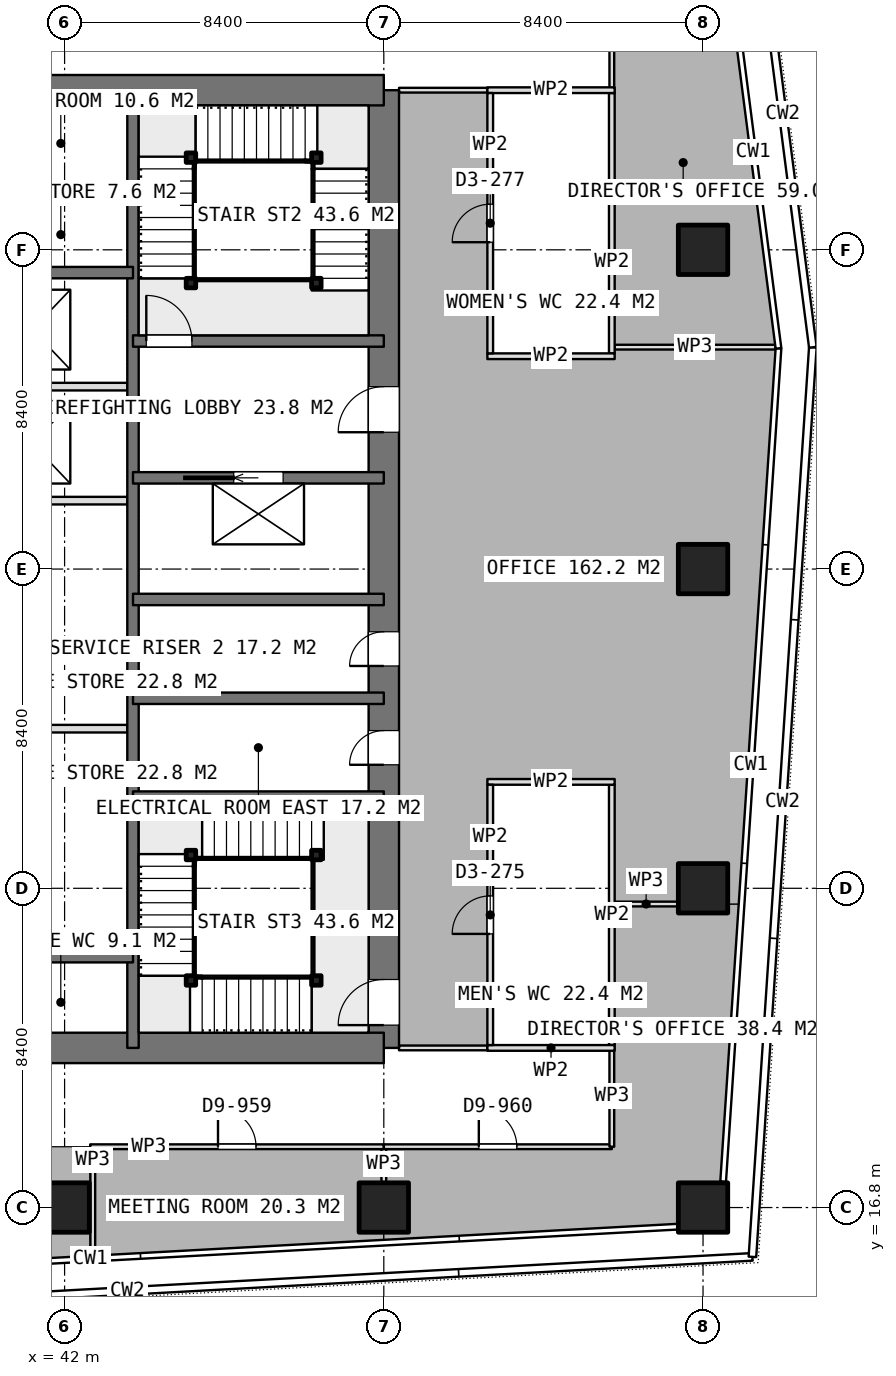
"""IFC4 building model, lengths in metres.
Left out: names, types, materials, properties, quantities, classifications, styles, units other than length and angle.
Written with IfcOpenShell. Run it as: python <this file> out.ifc"""

import sys

from ifc_helpers import new_model, si_unit, direction, frame, frame_2d, origin, origin_2d, place, context, subcontext, project, spatial, rectangle, extrude, element, fill, save


model = new_model("IFC4")
c1 = context("Model", 3, precision=1e-05, world=origin(), true_north=direction((0.0, 1.0)))
c2 = subcontext(c1, "Body", "Model", "MODEL_VIEW")
j1 = project(units=[si_unit("LENGTHUNIT", "METRE"), si_unit("PLANEANGLEUNIT", "RADIAN")], contexts=[c1])
p1 = place(None, origin())
s1 = spatial("IfcSite", under=j1, at=p1, CompositionType="ELEMENT")
p2 = place(p1, origin())
s2 = spatial("IfcBuilding", under=s1, at=p2, CompositionType="ELEMENT")
p3 = place(p2, frame((0.0, 0.0, 257.6)))
s3 = spatial("IfcBuildingStorey", under=s2, at=p3, CompositionType="ELEMENT", Elevation=257.6)
for number, where, z_axis, x_axis in (
    (1, (40.0, 21.0, 0.0), (0.0, 0.0, 1.0), (1.0, 0.0, 0.0)),
    (2, (40.0, 46.2, 0.0), (0.0, 0.0, 1.0), (1.0, 0.0, 0.0)),
):
    element("IfcWall", number, at=place(p3, frame(where, z_axis=z_axis, x_axis=x_axis)), inside=s3, PredefinedType="SHEAR", context=c2, shape_type="SweptSolid", body=[
        extrude(rectangle(XDim=10.4, YDim=0.8, at=frame_2d((5.2, 0.0))), origin(), (0.0, 0.0, 1.0), 3.75),
    ])
p4 = place(p3, frame((50.4, 21.0, 0.0), z_axis=(0.0, 0.0, 1.0), x_axis=(0.0, 1.0, 0.0)))
e3 = element("IfcWall", 3, at=p4, inside=s3, PredefinedType="SHEAR", context=c2, shape_type="SweptSolid", body=[
    extrude(rectangle(XDim=25.2, YDim=0.8, at=frame_2d((12.6, 0.0))), origin(), (0.0, 0.0, 1.0), 3.75),
])
p5 = place(p4, frame((16.2, 0.0, 0.0)))
e4 = element("IfcOpeningElement", 4, at=p5, cuts=e3, PredefinedType="OPENING", context=c2, shape_type="SweptSolid", body=[
    extrude(rectangle(XDim=1.2, YDim=2.1, at=frame_2d((0.6, 1.05))), frame((0.0, 0.41, 0.0), z_axis=(0.0, -1.0, 0.0), x_axis=(1.0, 0.0, 0.0)), (0.0, 0.0, 1.0), 0.82),
])
p6 = place(p4, frame((10.05, 0.0, 0.0)))
e5 = element("IfcOpeningElement", 5, at=p6, cuts=e3, PredefinedType="OPENING", context=c2, shape_type="SweptSolid", body=[
    extrude(rectangle(XDim=0.9, YDim=2.1, at=frame_2d((0.45, 1.05))), frame((0.0, 0.41, 0.0), z_axis=(0.0, -1.0, 0.0), x_axis=(1.0, 0.0, 0.0)), (0.0, 0.0, 1.0), 0.82),
])
p7 = place(p4, frame((7.45, 0.0, 0.0)))
e6 = element("IfcOpeningElement", 6, at=p7, cuts=e3, PredefinedType="OPENING", context=c2, shape_type="SweptSolid", body=[
    extrude(rectangle(XDim=0.9, YDim=2.1, at=frame_2d((0.45, 1.05))), frame((0.0, 0.41, 0.0), z_axis=(0.0, -1.0, 0.0), x_axis=(1.0, 0.0, 0.0)), (0.0, 0.0, 1.0), 0.82),
])
p8 = place(p4, frame((0.6, 0.0, 0.0)))
e7 = element("IfcOpeningElement", 7, at=p8, cuts=e3, PredefinedType="OPENING", context=c2, shape_type="SweptSolid", body=[
    extrude(rectangle(XDim=1.2, YDim=2.1, at=frame_2d((0.6, 1.05))), frame((0.0, 0.41, 0.0), z_axis=(0.0, -1.0, 0.0), x_axis=(1.0, 0.0, 0.0)), (0.0, 0.0, 1.0), 0.82),
])
p9 = place(p3, frame((43.8, 21.0, 0.0), z_axis=(0.0, 0.0, 1.0), x_axis=(0.0, 1.0, 0.0)))
e8 = element("IfcWall", 8, at=p9, inside=s3, PredefinedType="SHEAR", context=c2, shape_type="SweptSolid", body=[
    extrude(rectangle(XDim=25.2, YDim=0.3, at=frame_2d((12.6, 0.0))), origin(), (0.0, 0.0, 1.0), 3.75),
])
for number, where, z_axis, x_axis in (
    (9, (40.0, 23.4, 0.0), (0.0, 0.0, 1.0), (1.0, 0.0, 0.0)),
    (10, (40.0, 41.4, 0.0), (0.0, 0.0, 1.0), (1.0, 0.0, 0.0)),
):
    element("IfcWall", number, at=place(p3, frame(where, z_axis=z_axis, x_axis=x_axis)), inside=s3, PredefinedType="SHEAR", context=c2, shape_type="SweptSolid", body=[
        extrude(rectangle(XDim=3.8, YDim=0.3, at=frame_2d((1.9, 0.0))), origin(), (0.0, 0.0, 1.0), 3.75),
    ])
for number, where, z_axis, x_axis in (
    (11, (43.8, 27.6, 0.0), (0.0, 0.0, 1.0), (1.0, 0.0, 0.0)),
    (12, (43.8, 30.2, 0.0), (0.0, 0.0, 1.0), (1.0, 0.0, 0.0)),
    (13, (43.8, 32.8, 0.0), (0.0, 0.0, 1.0), (1.0, 0.0, 0.0)),
):
    element("IfcWall", number, at=place(p3, frame(where, z_axis=z_axis, x_axis=x_axis)), inside=s3, PredefinedType="SHEAR", context=c2, shape_type="SweptSolid", body=[
        extrude(rectangle(XDim=6.6, YDim=0.3, at=frame_2d((3.3, 0.0))), origin(), (0.0, 0.0, 1.0), 3.75),
    ])
p10 = place(p3, frame((43.8, 36.0, 0.0), z_axis=(0.0, 0.0, 1.0), x_axis=(1.0, 0.0, 0.0)))
e14 = element("IfcWall", 14, at=p10, inside=s3, PredefinedType="SHEAR", context=c2, shape_type="SweptSolid", body=[
    extrude(rectangle(XDim=6.6, YDim=0.3, at=frame_2d((3.3, 0.0))), origin(), (0.0, 0.0, 1.0), 3.75),
])
p11 = place(p10, frame((2.65, 0.0, 0.0)))
e15 = element("IfcOpeningElement", 15, at=p11, cuts=e14, PredefinedType="OPENING", context=c2, shape_type="SweptSolid", body=[
    extrude(rectangle(XDim=1.3, YDim=2.1, at=frame_2d((0.65, 1.05))), frame((0.0, 0.16, 0.0), z_axis=(0.0, -1.0, 0.0), x_axis=(1.0, 0.0, 0.0)), (0.0, 0.0, 1.0), 0.32),
])
p12 = place(p3, frame((43.8, 39.6, 0.0), z_axis=(0.0, 0.0, 1.0), x_axis=(1.0, 0.0, 0.0)))
e16 = element("IfcWall", 16, at=p12, inside=s3, PredefinedType="SHEAR", context=c2, shape_type="SweptSolid", body=[
    extrude(rectangle(XDim=6.6, YDim=0.3, at=frame_2d((3.3, 0.0))), origin(), (0.0, 0.0, 1.0), 3.75),
])
p13 = place(p12, frame((0.35, 0.0, 0.0)))
e17 = element("IfcOpeningElement", 17, at=p13, cuts=e16, PredefinedType="OPENING", context=c2, shape_type="SweptSolid", body=[
    extrude(rectangle(XDim=1.2, YDim=2.1, at=frame_2d((0.6, 1.05))), frame((0.0, 0.16, 0.0), z_axis=(0.0, -1.0, 0.0), x_axis=(1.0, 0.0, 0.0)), (0.0, 0.0, 1.0), 0.32),
])
for number, where, z_axis, x_axis in (
    (18, (42.0, 16.8, 0.0), (0.0, 0.0, 1.0), (1.0, 0.0, 0.0)),
    (19, (50.4, 16.8, 0.0), (0.0, 0.0, 1.0), (1.0, 0.0, 0.0)),
    (20, (58.8, 16.8, 0.0), (0.0, 0.0, 1.0), (1.0, 0.0, 0.0)),
    (21, (58.8, 25.2, 0.0), (0.0, 0.0, 1.0), (1.0, 0.0, 0.0)),
    (22, (58.8, 33.6, 0.0), (0.0, 0.0, 1.0), (1.0, 0.0, 0.0)),
    (23, (58.8, 42.0, 0.0), (0.0, 0.0, 1.0), (1.0, 0.0, 0.0)),
):
    element("IfcColumn", number, at=place(p3, frame(where, z_axis=z_axis, x_axis=x_axis)), inside=s3, PredefinedType="COLUMN", context=c2, shape_type="SweptSolid", body=[
        extrude(rectangle(XDim=1.3, YDim=1.3, at=origin_2d()), origin(), (0.0, 0.0, 1.0), 3.75),
    ])
for number, where, z_axis, x_axis in (
    (24, (40.15, 29.4, 0.0), (0.0, 0.0, 1.0), (1.0, 0.0, 0.0)),
    (25, (40.15, 35.4, 0.0), (0.0, 0.0, 1.0), (1.0, 0.0, 0.0)),
    (26, (40.15, 38.4, 0.0), (0.0, 0.0, 1.0), (1.0, 0.0, 0.0)),
):
    element("IfcWall", number, at=place(p3, frame(where, z_axis=z_axis, x_axis=x_axis)), inside=s3, PredefinedType="PARTITIONING", context=c2, shape_type="SweptSolid", body=[
        extrude(rectangle(XDim=3.5, YDim=0.2, at=frame_2d((1.75, 0.0))), origin(), (0.0, 0.0, 1.0), 3.5),
    ])
p14 = place(p3, frame((40.0, 43.4, 0.0), z_axis=(0.0, 0.0, 1.0), x_axis=(1.0, 0.0, 0.0)))
e27 = element("IfcWall", 27, at=p14, inside=s3, PredefinedType="PARTITIONING", context=c2, shape_type="SweptSolid", body=[
    extrude(rectangle(XDim=3.65, YDim=0.2, at=frame_2d((1.825, 0.0))), origin(), (0.0, 0.0, 1.0), 3.5),
])
for number, where, z_axis, x_axis in (
    (28, (53.125, 39.2, 0.0), (0.0, 0.0, 1.0), (1.0, 0.0, 0.0)),
    (29, (53.125, 46.2, 0.0), (0.0, 0.0, 1.0), (1.0, 0.0, 0.0)),
):
    element("IfcWall", number, at=place(p3, frame(where, z_axis=z_axis, x_axis=x_axis)), inside=s3, PredefinedType="PARTITIONING", context=c2, shape_type="SweptSolid", body=[
        extrude(rectangle(XDim=3.35, YDim=0.15, at=frame_2d((1.675, 0.0))), origin(), (0.0, 0.0, 1.0), 3.5),
    ])
p15 = place(p3, frame((53.2, 39.275, 0.0), z_axis=(0.0, 0.0, 1.0), x_axis=(0.0, 1.0, 0.0)))
e30 = element("IfcWall", 30, at=p15, inside=s3, PredefinedType="PARTITIONING", context=c2, shape_type="SweptSolid", body=[
    extrude(rectangle(XDim=6.85, YDim=0.15, at=frame_2d((3.425, 0.0))), origin(), (0.0, 0.0, 1.0), 3.5),
])
p16 = place(p15, frame((2.925, 0.0, 0.0)))
e31 = element("IfcOpeningElement", 31, at=p16, cuts=e30, PredefinedType="OPENING", context=c2, shape_type="SweptSolid", body=[
    extrude(rectangle(XDim=1.0, YDim=2.1, at=frame_2d((0.5, 1.05))), frame((0.0, 0.085, 0.0), z_axis=(0.0, -1.0, 0.0), x_axis=(1.0, 0.0, 0.0)), (0.0, 0.0, 1.0), 0.17),
])
p17 = place(p3, frame((56.4, 39.275, 0.0), z_axis=(0.0, 0.0, 1.0), x_axis=(0.0, 1.0, 0.0)))
e32 = element("IfcWall", 32, at=p17, inside=s3, PredefinedType="PARTITIONING", context=c2, shape_type="SweptSolid", body=[
    extrude(rectangle(XDim=6.85, YDim=0.15, at=frame_2d((3.425, 0.0))), origin(), (0.0, 0.0, 1.0), 3.5),
])
for number, where, z_axis, x_axis in (
    (33, (53.125, 21.0, 0.0), (0.0, 0.0, 1.0), (1.0, 0.0, 0.0)),
    (34, (53.125, 28.0, 0.0), (0.0, 0.0, 1.0), (1.0, 0.0, 0.0)),
):
    element("IfcWall", number, at=place(p3, frame(where, z_axis=z_axis, x_axis=x_axis)), inside=s3, PredefinedType="PARTITIONING", context=c2, shape_type="SweptSolid", body=[
        extrude(rectangle(XDim=3.35, YDim=0.15, at=frame_2d((1.675, 0.0))), origin(), (0.0, 0.0, 1.0), 3.5),
    ])
p18 = place(p3, frame((53.2, 21.075, 0.0), z_axis=(0.0, 0.0, 1.0), x_axis=(0.0, 1.0, 0.0)))
e35 = element("IfcWall", 35, at=p18, inside=s3, PredefinedType="PARTITIONING", context=c2, shape_type="SweptSolid", body=[
    extrude(rectangle(XDim=6.85, YDim=0.15, at=frame_2d((3.425, 0.0))), origin(), (0.0, 0.0, 1.0), 3.5),
])
p19 = place(p18, frame((2.925, 0.0, 0.0)))
e36 = element("IfcOpeningElement", 36, at=p19, cuts=e35, PredefinedType="OPENING", context=c2, shape_type="SweptSolid", body=[
    extrude(rectangle(XDim=1.0, YDim=2.1, at=frame_2d((0.5, 1.05))), frame((0.0, 0.085, 0.0), z_axis=(0.0, -1.0, 0.0), x_axis=(1.0, 0.0, 0.0)), (0.0, 0.0, 1.0), 0.17),
])
p20 = place(p3, frame((56.4, 21.075, 0.0), z_axis=(0.0, 0.0, 1.0), x_axis=(0.0, 1.0, 0.0)))
e37 = element("IfcWall", 37, at=p20, inside=s3, PredefinedType="PARTITIONING", context=c2, shape_type="SweptSolid", body=[
    extrude(rectangle(XDim=6.85, YDim=0.15, at=frame_2d((3.425, 0.0))), origin(), (0.0, 0.0, 1.0), 3.5),
])
p21 = place(p3, frame((50.4, 18.4, 0.0), z_axis=(0.0, 0.0, 1.0), x_axis=(0.0, -1.0, 0.0)))
e38 = element("IfcWall", 38, at=p21, inside=s3, PredefinedType="PARTITIONING", context=c2, shape_type="SweptSolid", body=[
    extrude(rectangle(XDim=0.93, YDim=0.125, at=frame_2d((0.465, 0.0))), origin(), (0.0, 0.0, 1.0), 3.5),
])
p22 = place(p3, frame((42.742, 15.538, 0.0), z_axis=(0.0, 0.0, 1.0), x_axis=(0.0, 1.0, 0.0)))
e39 = element("IfcWall", 39, at=p22, inside=s3, PredefinedType="PARTITIONING", context=c2, shape_type="SweptSolid", body=[
    extrude(rectangle(XDim=2.799, YDim=0.125, at=frame_2d((1.399, 0.0))), origin(), (0.0, 0.0, 1.0), 3.5),
])
p23 = place(p3, frame((42.674, 18.4, 0.0), z_axis=(0.0, 0.0, 1.0), x_axis=(1.0, 0.0, 0.0)))
e40 = element("IfcWall", 40, at=p23, inside=s3, PredefinedType="PARTITIONING", context=c2, shape_type="SweptSolid", body=[
    extrude(rectangle(XDim=7.726, YDim=0.125, at=frame_2d((3.863, 0.0))), origin(), (0.0, 0.0, 1.0), 3.5),
])
p24 = place(p23, frame((3.363, 0.0, 0.0)))
e41 = element("IfcOpeningElement", 41, at=p24, cuts=e40, PredefinedType="OPENING", context=c2, shape_type="SweptSolid", body=[
    extrude(rectangle(XDim=1.0, YDim=2.1, at=frame_2d((0.5, 1.05))), frame((0.0, 0.073, 0.0), z_axis=(0.0, -1.0, 0.0), x_axis=(1.0, 0.0, 0.0)), (0.0, 0.0, 1.0), 0.145),
])
p25 = place(p3, frame((56.475, 24.786, 0.0), z_axis=(0.0, 0.0, 1.0), x_axis=(1.0, 0.0, 0.0)))
e42 = element("IfcWall", 42, at=p25, inside=s3, PredefinedType="PARTITIONING", context=c2, shape_type="SweptSolid", body=[
    extrude(rectangle(XDim=1.655, YDim=0.125, at=frame_2d((0.827, 0.0))), origin(), (0.0, 0.0, 1.0), 3.5),
])
p26 = place(p3, frame((50.401, 18.4, 0.0), z_axis=(0.0, 0.0, 1.0), x_axis=(1.0, 0.0, 0.0)))
e43 = element("IfcWall", 43, at=p26, inside=s3, PredefinedType="PARTITIONING", context=c2, shape_type="SweptSolid", body=[
    extrude(rectangle(XDim=5.999, YDim=0.125, at=frame_2d((3.0, 0.0))), origin(), (0.0, 0.0, 1.0), 3.5),
])
p27 = place(p26, frame((2.499, 0.0, 0.0)))
e44 = element("IfcOpeningElement", 44, at=p27, cuts=e43, PredefinedType="OPENING", context=c2, shape_type="SweptSolid", body=[
    extrude(rectangle(XDim=1.0, YDim=2.1, at=frame_2d((0.5, 1.05))), frame((0.0, 0.073, 0.0), z_axis=(0.0, -1.0, 0.0), x_axis=(1.0, 0.0, 0.0)), (0.0, 0.0, 1.0), 0.145),
])
p28 = place(p3, frame((56.4, 18.4, 0.0), z_axis=(0.0, 0.0, 1.0), x_axis=(0.0, 1.0, 0.0)))
e45 = element("IfcWall", 45, at=p28, inside=s3, PredefinedType="PARTITIONING", context=c2, shape_type="SweptSolid", body=[
    extrude(rectangle(XDim=2.675, YDim=0.125, at=frame_2d((1.337, 0.0))), origin(), (0.0, 0.0, 1.0), 3.5),
])
for number, where, z_axis, x_axis in (
    (46, (53.124, 21.0, 0.0), (0.0, 0.0, 1.0), (-1.0, 0.0, 0.0)),
    (47, (50.8, 46.2, 0.0), (0.0, 0.0, 1.0), (1.0, 0.0, 0.0)),
):
    element("IfcWall", number, at=place(p3, frame(where, z_axis=z_axis, x_axis=x_axis)), inside=s3, PredefinedType="PARTITIONING", context=c2, shape_type="SweptSolid", body=[
        extrude(rectangle(XDim=2.324, YDim=0.125, at=frame_2d((1.162, 0.0))), origin(), (0.0, 0.0, 1.0), 3.5),
    ])
p29 = place(p3, frame((56.475, 39.439, 0.0), z_axis=(0.0, 0.0, 1.0), x_axis=(1.0, 0.0, 0.0)))
e48 = element("IfcWall", 48, at=p29, inside=s3, PredefinedType="PARTITIONING", context=c2, shape_type="SweptSolid", body=[
    extrude(rectangle(XDim=4.225, YDim=0.125, at=frame_2d((2.112, 0.0))), origin(), (0.0, 0.0, 1.0), 3.5),
])
p30 = place(p3, frame((56.4, 46.125, 0.0), z_axis=(0.0, 0.0, 1.0), x_axis=(0.0, 1.0, 0.0)))
e49 = element("IfcWall", 49, at=p30, inside=s3, PredefinedType="PARTITIONING", context=c2, shape_type="SweptSolid", body=[
    extrude(rectangle(XDim=3.025, YDim=0.125, at=frame_2d((1.512, 0.0))), origin(), (0.0, 0.0, 1.0), 3.5),
])
for number, where, z_axis, x_axis in (
    (50, (45.325, 41.125, 0.0), (0.0, 0.0, 1.0), (1.0, 0.0, 0.0)),
    (51, (45.325, 44.425, 0.0), (0.0, 0.0, 1.0), (1.0, 0.0, 0.0)),
    (52, (48.625, 44.425, 0.0), (0.0, 0.0, 1.0), (1.0, 0.0, 0.0)),
    (53, (48.625, 41.125, 0.0), (0.0, 0.0, 1.0), (1.0, 0.0, 0.0)),
    (54, (48.625, 22.775, 0.0), (0.0, 0.0, 1.0), (1.0, 0.0, 0.0)),
    (55, (45.325, 22.775, 0.0), (0.0, 0.0, 1.0), (1.0, 0.0, 0.0)),
    (56, (45.325, 26.075, 0.0), (0.0, 0.0, 1.0), (1.0, 0.0, 0.0)),
    (57, (48.625, 26.075, 0.0), (0.0, 0.0, 1.0), (1.0, 0.0, 0.0)),
):
    element("IfcColumn", number, at=place(p3, frame(where, z_axis=z_axis, x_axis=x_axis)), inside=s3, PredefinedType="COLUMN", context=c2, shape_type="SweptSolid", body=[
        extrude(rectangle(XDim=0.25, YDim=0.25, at=origin_2d()), origin(), (0.0, 0.0, 1.0), 3.75),
    ])
p31 = place(p5, origin())
e58 = element("IfcDoor", 58, at=p31, inside=s3, OperationType="SINGLE_SWING_LEFT", PredefinedType="DOOR", context=c2, shape_type="SweptSolid", body=[
    extrude(rectangle(XDim=1.2, YDim=2.1, at=frame_2d((0.6, 1.05))), frame((0.0, 0.025, 0.0), z_axis=(0.0, -1.0, 0.0), x_axis=(1.0, 0.0, 0.0)), (0.0, 0.0, 1.0), 0.05),
])
fill(e4, e58)
p32 = place(p6, origin())
e59 = element("IfcDoor", 59, at=p32, inside=s3, OperationType="SINGLE_SWING_LEFT", PredefinedType="DOOR", context=c2, shape_type="SweptSolid", body=[
    extrude(rectangle(XDim=0.9, YDim=2.1, at=frame_2d((0.45, 1.05))), frame((0.0, 0.025, 0.0), z_axis=(0.0, -1.0, 0.0), x_axis=(1.0, 0.0, 0.0)), (0.0, 0.0, 1.0), 0.05),
])
fill(e5, e59)
p33 = place(p7, origin())
e60 = element("IfcDoor", 60, at=p33, inside=s3, OperationType="SINGLE_SWING_LEFT", PredefinedType="DOOR", context=c2, shape_type="SweptSolid", body=[
    extrude(rectangle(XDim=0.9, YDim=2.1, at=frame_2d((0.45, 1.05))), frame((0.0, 0.025, 0.0), z_axis=(0.0, -1.0, 0.0), x_axis=(1.0, 0.0, 0.0)), (0.0, 0.0, 1.0), 0.05),
])
fill(e6, e60)
p34 = place(p11, origin())
e61 = element("IfcDoor", 61, at=p34, inside=s3, OperationType="SLIDING_TO_LEFT", PredefinedType="USERDEFINED", context=c2, shape_type="SweptSolid", body=[
    extrude(rectangle(XDim=1.3, YDim=2.1, at=frame_2d((0.65, 1.05))), frame((0.0, 0.025, 0.0), z_axis=(0.0, -1.0, 0.0), x_axis=(1.0, 0.0, 0.0)), (0.0, 0.0, 1.0), 0.05),
])
fill(e15, e61)
p35 = place(p16, origin())
e62 = element("IfcDoor", 62, at=p35, inside=s3, OperationType="SINGLE_SWING_LEFT", PredefinedType="DOOR", context=c2, shape_type="SweptSolid", body=[
    extrude(rectangle(XDim=1.0, YDim=2.1, at=frame_2d((0.5, 1.05))), frame((0.0, 0.025, 0.0), z_axis=(0.0, -1.0, 0.0), x_axis=(1.0, 0.0, 0.0)), (0.0, 0.0, 1.0), 0.05),
])
fill(e31, e62)
p36 = place(p19, origin())
e63 = element("IfcDoor", 63, at=p36, inside=s3, OperationType="SINGLE_SWING_LEFT", PredefinedType="DOOR", context=c2, shape_type="SweptSolid", body=[
    extrude(rectangle(XDim=1.0, YDim=2.1, at=frame_2d((0.5, 1.05))), frame((0.0, 0.025, 0.0), z_axis=(0.0, -1.0, 0.0), x_axis=(1.0, 0.0, 0.0)), (0.0, 0.0, 1.0), 0.05),
])
fill(e36, e63)
p37 = place(p24, origin())
e64 = element("IfcDoor", 64, at=p37, inside=s3, OperationType="SINGLE_SWING_LEFT", PredefinedType="DOOR", context=c2, shape_type="SweptSolid", body=[
    extrude(rectangle(XDim=1.0, YDim=2.1, at=frame_2d((0.5, 1.05))), frame((0.0, 0.025, 0.0), z_axis=(0.0, -1.0, 0.0), x_axis=(1.0, 0.0, 0.0)), (0.0, 0.0, 1.0), 0.05),
])
fill(e41, e64)
p38 = place(p27, origin())
e65 = element("IfcDoor", 65, at=p38, inside=s3, OperationType="SINGLE_SWING_LEFT", PredefinedType="DOOR", context=c2, shape_type="SweptSolid", body=[
    extrude(rectangle(XDim=1.0, YDim=2.1, at=frame_2d((0.5, 1.05))), frame((0.0, 0.025, 0.0), z_axis=(0.0, -1.0, 0.0), x_axis=(1.0, 0.0, 0.0)), (0.0, 0.0, 1.0), 0.05),
])
fill(e44, e65)
p39 = place(p13, origin())
e66 = element("IfcDoor", 66, at=p39, inside=s3, OperationType="SINGLE_SWING_RIGHT", PredefinedType="DOOR", context=c2, shape_type="SweptSolid", body=[
    extrude(rectangle(XDim=1.2, YDim=2.1, at=frame_2d((0.6, 1.05))), frame((0.0, 0.025, 0.0), z_axis=(0.0, -1.0, 0.0), x_axis=(1.0, 0.0, 0.0)), (0.0, 0.0, 1.0), 0.05),
])
fill(e17, e66)
p40 = place(p8, origin())
e67 = element("IfcDoor", 67, at=p40, inside=s3, OperationType="SINGLE_SWING_RIGHT", PredefinedType="DOOR", context=c2, shape_type="SweptSolid", body=[
    extrude(rectangle(XDim=1.2, YDim=2.1, at=frame_2d((0.6, 1.05))), frame((0.0, 0.025, 0.0), z_axis=(0.0, -1.0, 0.0), x_axis=(1.0, 0.0, 0.0)), (0.0, 0.0, 1.0), 0.05),
])
fill(e7, e67)
save(model, sys.argv[1])
